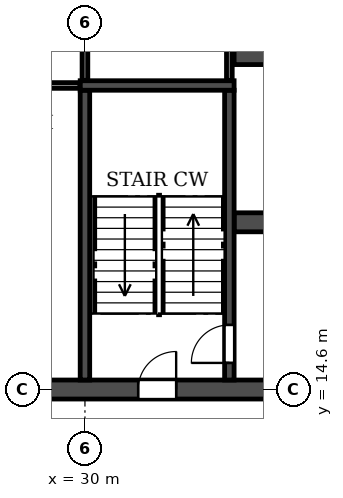
"""IFC4 building model, lengths in metres.
Left out: names, types, materials, properties, quantities, classifications, styles, units other than length and angle.
Written with IfcOpenShell. Run it as: python <this file> out.ifc"""

import sys

from ifc_helpers import new_model, si_unit, direction, frame, frame_2d, origin, place, context, subcontext, project, spatial, rectangle, extrude, element, fill, save


model = new_model("IFC4")
c1 = context("Model", 3, precision=1e-05, world=origin(), true_north=direction((0.0, 1.0)))
c2 = subcontext(c1, "Body", "Model", "MODEL_VIEW")
j1 = project(units=[si_unit("LENGTHUNIT", "METRE"), si_unit("PLANEANGLEUNIT", "RADIAN")], contexts=[c1])
p1 = place(None, origin())
s1 = spatial("IfcSite", under=j1, at=p1, CompositionType="ELEMENT")
p2 = place(p1, origin())
s2 = spatial("IfcBuilding", under=s1, at=p2, CompositionType="ELEMENT")
p3 = place(p2, frame((0.0, 0.0, 105.9)))
s3 = spatial("IfcBuildingStorey", under=s2, at=p3, CompositionType="ELEMENT", Elevation=105.9)
p4 = place(p3, frame((14.6, 14.6, 0.0), z_axis=(0.0, 0.0, 1.0), x_axis=(1.0, 0.0, 0.0)))
e1 = element("IfcWall", 1, at=p4, inside=s3, PredefinedType="SOLIDWALL", context=c2, shape_type="SweptSolid", body=[
    extrude(rectangle(XDim=72.8, YDim=0.5, at=frame_2d((36.4, 0.0))), origin(), (0.0, 0.0, 1.0), 3.06),
])
p5 = place(p4, frame((4.3, 0.0, 0.0)))
e2 = element("IfcOpeningElement", 2, at=p5, cuts=e1, PredefinedType="OPENING", context=c2, shape_type="SweptSolid", body=[
    extrude(rectangle(XDim=1.0, YDim=2.1, at=frame_2d((0.5, 1.05))), frame((0.0, 0.26, 0.0), z_axis=(0.0, -1.0, 0.0), x_axis=(1.0, 0.0, 0.0)), (0.0, 0.0, 1.0), 0.52),
])
p6 = place(p4, frame((12.25, 0.0, 0.0)))
e3 = element("IfcOpeningElement", 3, at=p6, cuts=e1, PredefinedType="OPENING", context=c2, shape_type="SweptSolid", body=[
    extrude(rectangle(XDim=0.9, YDim=2.1, at=frame_2d((0.45, 1.05))), frame((0.0, 0.26, 0.0), z_axis=(0.0, -1.0, 0.0), x_axis=(1.0, 0.0, 0.0)), (0.0, 0.0, 1.0), 0.52),
])
p7 = place(p4, frame((16.8, 0.0, 0.0)))
e4 = element("IfcOpeningElement", 4, at=p7, cuts=e1, PredefinedType="OPENING", context=c2, shape_type="SweptSolid", body=[
    extrude(rectangle(XDim=1.0, YDim=2.1, at=frame_2d((0.5, 1.05))), frame((0.0, 0.26, 0.0), z_axis=(0.0, -1.0, 0.0), x_axis=(1.0, 0.0, 0.0)), (0.0, 0.0, 1.0), 0.52),
])
p8 = place(p4, frame((30.7, 0.0, 0.0)))
e5 = element("IfcOpeningElement", 5, at=p8, cuts=e1, PredefinedType="OPENING", context=c2, shape_type="SweptSolid", body=[
    extrude(rectangle(XDim=1.0, YDim=2.1, at=frame_2d((0.5, 1.05))), frame((0.0, 0.26, 0.0), z_axis=(0.0, -1.0, 0.0), x_axis=(1.0, 0.0, 0.0)), (0.0, 0.0, 1.0), 0.52),
])
p9 = place(p4, frame((35.9, 0.0, 0.0)))
e6 = element("IfcOpeningElement", 6, at=p9, cuts=e1, PredefinedType="OPENING", context=c2, shape_type="SweptSolid", body=[
    extrude(rectangle(XDim=1.0, YDim=2.1, at=frame_2d((0.5, 1.05))), frame((0.0, 0.26, 0.0), z_axis=(0.0, -1.0, 0.0), x_axis=(1.0, 0.0, 0.0)), (0.0, 0.0, 1.0), 0.52),
])
p10 = place(p4, frame((39.8, 0.0, 0.0)))
e7 = element("IfcOpeningElement", 7, at=p10, cuts=e1, PredefinedType="OPENING", context=c2, shape_type="SweptSolid", body=[
    extrude(rectangle(XDim=1.0, YDim=2.1, at=frame_2d((0.5, 1.05))), frame((0.0, 0.26, 0.0), z_axis=(0.0, -1.0, 0.0), x_axis=(1.0, 0.0, 0.0)), (0.0, 0.0, 1.0), 0.52),
])
p11 = place(p4, frame((43.7, 0.0, 0.0)))
e8 = element("IfcOpeningElement", 8, at=p11, cuts=e1, PredefinedType="OPENING", context=c2, shape_type="SweptSolid", body=[
    extrude(rectangle(XDim=1.0, YDim=2.1, at=frame_2d((0.5, 1.05))), frame((0.0, 0.26, 0.0), z_axis=(0.0, -1.0, 0.0), x_axis=(1.0, 0.0, 0.0)), (0.0, 0.0, 1.0), 0.52),
])
p12 = place(p4, frame((55.0, 0.0, 0.0)))
e9 = element("IfcOpeningElement", 9, at=p12, cuts=e1, PredefinedType="OPENING", context=c2, shape_type="SweptSolid", body=[
    extrude(rectangle(XDim=1.0, YDim=2.1, at=frame_2d((0.5, 1.05))), frame((0.0, 0.26, 0.0), z_axis=(0.0, -1.0, 0.0), x_axis=(1.0, 0.0, 0.0)), (0.0, 0.0, 1.0), 0.52),
])
p13 = place(p4, frame((59.65, 0.0, 0.0)))
e10 = element("IfcOpeningElement", 10, at=p13, cuts=e1, PredefinedType="OPENING", context=c2, shape_type="SweptSolid", body=[
    extrude(rectangle(XDim=0.9, YDim=2.1, at=frame_2d((0.45, 1.05))), frame((0.0, 0.26, 0.0), z_axis=(0.0, -1.0, 0.0), x_axis=(1.0, 0.0, 0.0)), (0.0, 0.0, 1.0), 0.52),
])
p14 = place(p4, frame((67.5, 0.0, 0.0)))
e11 = element("IfcOpeningElement", 11, at=p14, cuts=e1, PredefinedType="OPENING", context=c2, shape_type="SweptSolid", body=[
    extrude(rectangle(XDim=1.0, YDim=2.1, at=frame_2d((0.5, 1.05))), frame((0.0, 0.26, 0.0), z_axis=(0.0, -1.0, 0.0), x_axis=(1.0, 0.0, 0.0)), (0.0, 0.0, 1.0), 0.52),
])
p15 = place(p3, frame((33.925, 19.0, 0.0), z_axis=(0.0, 0.0, 1.0), x_axis=(1.0, 0.0, 0.0)))
e12 = element("IfcWall", 12, at=p15, inside=s3, PredefinedType="SOLIDWALL", context=c2, shape_type="SweptSolid", body=[
    extrude(rectangle(XDim=34.15, YDim=0.5, at=frame_2d((17.075, 0.0))), origin(), (0.0, 0.0, 1.0), 3.06),
])
p16 = place(p15, frame((16.175, 0.0, 0.0)))
e13 = element("IfcOpeningElement", 13, at=p16, cuts=e12, PredefinedType="OPENING", context=c2, shape_type="SweptSolid", body=[
    extrude(rectangle(XDim=1.8, YDim=2.1, at=frame_2d((0.9, 1.05))), frame((0.0, 0.26, 0.0), z_axis=(0.0, -1.0, 0.0), x_axis=(1.0, 0.0, 0.0)), (0.0, 0.0, 1.0), 0.52),
])
p17 = place(p15, frame((1.525, 0.0, 0.0)))
e14 = element("IfcOpeningElement", 14, at=p17, cuts=e12, PredefinedType="OPENING", context=c2, shape_type="SweptSolid", body=[
    extrude(rectangle(XDim=1.8, YDim=2.1, at=frame_2d((0.9, 1.05))), frame((0.0, 0.26, 0.0), z_axis=(0.0, -1.0, 0.0), x_axis=(1.0, 0.0, 0.0)), (0.0, 0.0, 1.0), 0.52),
])
p18 = place(p15, frame((8.725, 0.0, 0.0)))
e15 = element("IfcOpeningElement", 15, at=p18, cuts=e12, PredefinedType="OPENING", context=c2, shape_type="SweptSolid", body=[
    extrude(rectangle(XDim=1.1, YDim=2.1, at=frame_2d((0.55, 1.05))), frame((0.0, 0.26, 0.0), z_axis=(0.0, -1.0, 0.0), x_axis=(1.0, 0.0, 0.0)), (0.0, 0.0, 1.0), 0.52),
])
p19 = place(p15, frame((11.325, 0.0, 0.0)))
e16 = element("IfcOpeningElement", 16, at=p19, cuts=e12, PredefinedType="OPENING", context=c2, shape_type="SweptSolid", body=[
    extrude(rectangle(XDim=1.1, YDim=2.1, at=frame_2d((0.55, 1.05))), frame((0.0, 0.26, 0.0), z_axis=(0.0, -1.0, 0.0), x_axis=(1.0, 0.0, 0.0)), (0.0, 0.0, 1.0), 0.52),
])
p20 = place(p15, frame((13.925, 0.0, 0.0)))
e17 = element("IfcOpeningElement", 17, at=p20, cuts=e12, PredefinedType="OPENING", context=c2, shape_type="SweptSolid", body=[
    extrude(rectangle(XDim=1.1, YDim=2.1, at=frame_2d((0.55, 1.05))), frame((0.0, 0.26, 0.0), z_axis=(0.0, -1.0, 0.0), x_axis=(1.0, 0.0, 0.0)), (0.0, 0.0, 1.0), 0.52),
])
p21 = place(p15, frame((19.125, 0.0, 0.0)))
e18 = element("IfcOpeningElement", 18, at=p21, cuts=e12, PredefinedType="OPENING", context=c2, shape_type="SweptSolid", body=[
    extrude(rectangle(XDim=1.1, YDim=2.1, at=frame_2d((0.55, 1.05))), frame((0.0, 0.26, 0.0), z_axis=(0.0, -1.0, 0.0), x_axis=(1.0, 0.0, 0.0)), (0.0, 0.0, 1.0), 0.52),
])
p22 = place(p15, frame((21.725, 0.0, 0.0)))
e19 = element("IfcOpeningElement", 19, at=p22, cuts=e12, PredefinedType="OPENING", context=c2, shape_type="SweptSolid", body=[
    extrude(rectangle(XDim=1.1, YDim=2.1, at=frame_2d((0.55, 1.05))), frame((0.0, 0.26, 0.0), z_axis=(0.0, -1.0, 0.0), x_axis=(1.0, 0.0, 0.0)), (0.0, 0.0, 1.0), 0.52),
])
p23 = place(p15, frame((24.325, 0.0, 0.0)))
e20 = element("IfcOpeningElement", 20, at=p23, cuts=e12, PredefinedType="OPENING", context=c2, shape_type="SweptSolid", body=[
    extrude(rectangle(XDim=1.1, YDim=2.1, at=frame_2d((0.55, 1.05))), frame((0.0, 0.26, 0.0), z_axis=(0.0, -1.0, 0.0), x_axis=(1.0, 0.0, 0.0)), (0.0, 0.0, 1.0), 0.52),
])
p24 = place(p15, frame((30.825, 0.0, 0.0)))
e21 = element("IfcOpeningElement", 21, at=p24, cuts=e12, PredefinedType="OPENING", context=c2, shape_type="SweptSolid", body=[
    extrude(rectangle(XDim=1.8, YDim=2.1, at=frame_2d((0.9, 1.05))), frame((0.0, 0.26, 0.0), z_axis=(0.0, -1.0, 0.0), x_axis=(1.0, 0.0, 0.0)), (0.0, 0.0, 1.0), 0.52),
])
p25 = place(p3, frame((33.925, 23.4, 0.0), z_axis=(0.0, 0.0, 1.0), x_axis=(1.0, 0.0, 0.0)))
e22 = element("IfcWall", 22, at=p25, inside=s3, PredefinedType="SOLIDWALL", context=c2, shape_type="SweptSolid", body=[
    extrude(rectangle(XDim=34.15, YDim=0.5, at=frame_2d((17.075, 0.0))), origin(), (0.0, 0.0, 1.0), 3.06),
])
p26 = place(p25, frame((16.175, 0.0, 0.0)))
e23 = element("IfcOpeningElement", 23, at=p26, cuts=e22, PredefinedType="OPENING", context=c2, shape_type="SweptSolid", body=[
    extrude(rectangle(XDim=1.8, YDim=2.1, at=frame_2d((0.9, 1.05))), frame((0.0, 0.26, 0.0), z_axis=(0.0, -1.0, 0.0), x_axis=(1.0, 0.0, 0.0)), (0.0, 0.0, 1.0), 0.52),
])
p27 = place(p25, frame((11.025, 0.0, 0.0)))
e24 = element("IfcOpeningElement", 24, at=p27, cuts=e22, PredefinedType="OPENING", context=c2, shape_type="SweptSolid", body=[
    extrude(rectangle(XDim=1.1, YDim=2.1, at=frame_2d((0.55, 1.05))), frame((0.0, 0.26, 0.0), z_axis=(0.0, -1.0, 0.0), x_axis=(1.0, 0.0, 0.0)), (0.0, 0.0, 1.0), 0.52),
])
p28 = place(p3, frame((30.0, 14.85, 0.0), z_axis=(0.0, 0.0, 1.0), x_axis=(0.0, 1.0, 0.0)))
e25 = element("IfcWall", 25, at=p28, inside=s3, PredefinedType="SOLIDWALL", context=c2, shape_type="SweptSolid", body=[
    extrude(rectangle(XDim=7.625, YDim=0.25, at=frame_2d((3.812, 0.0))), origin(), (0.0, 0.0, 1.0), 3.06),
])
p29 = place(p3, frame((33.8, 14.85, 0.0), z_axis=(0.0, 0.0, 1.0), x_axis=(0.0, 1.0, 0.0)))
e26 = element("IfcWall", 26, at=p29, inside=s3, PredefinedType="SOLIDWALL", context=c2, shape_type="SweptSolid", body=[
    extrude(rectangle(XDim=7.625, YDim=0.25, at=frame_2d((3.812, 0.0))), origin(), (0.0, 0.0, 1.0), 3.06),
])
p30 = place(p29, frame((0.45, 0.0, 0.0)))
e27 = element("IfcOpeningElement", 27, at=p30, cuts=e26, PredefinedType="OPENING", context=c2, shape_type="SweptSolid", body=[
    extrude(rectangle(XDim=1.0, YDim=2.1, at=frame_2d((0.5, 1.05))), frame((0.0, 0.135, 0.0), z_axis=(0.0, -1.0, 0.0), x_axis=(1.0, 0.0, 0.0)), (0.0, 0.0, 1.0), 0.27),
])
p31 = place(p3, frame((29.875, 22.6, 0.0), z_axis=(0.0, 0.0, 1.0), x_axis=(1.0, 0.0, 0.0)))
e28 = element("IfcWall", 28, at=p31, inside=s3, PredefinedType="SOLIDWALL", context=c2, shape_type="SweptSolid", body=[
    extrude(rectangle(XDim=4.05, YDim=0.25, at=frame_2d((2.025, 0.0))), origin(), (0.0, 0.0, 1.0), 3.06),
])
p32 = place(p3, frame((24.735, 22.6, 0.0), z_axis=(0.0, 0.0, 1.0), x_axis=(1.0, 0.0, 0.0)))
e29 = element("IfcWall", 29, at=p32, inside=s3, PredefinedType="PARTITIONING", context=c2, shape_type="SweptSolid", body=[
    extrude(rectangle(XDim=5.13, YDim=0.15, at=frame_2d((2.565, 0.0))), origin(), (0.0, 0.0, 1.0), 3.06),
])
for number, where, z_axis, x_axis in (
    (30, (30.0, 22.735, 0.0), (0.0, 0.0, 1.0), (0.0, 1.0, 0.0)),
    (31, (33.8, 22.735, 0.0), (0.0, 0.0, 1.0), (0.0, 1.0, 0.0)),
):
    element("IfcWall", number, at=place(p3, frame(where, z_axis=z_axis, x_axis=x_axis)), inside=s3, PredefinedType="PARTITIONING", context=c2, shape_type="SweptSolid", body=[
        extrude(rectangle(XDim=4.805, YDim=0.15, at=frame_2d((2.402, 0.0))), origin(), (0.0, 0.0, 1.0), 3.06),
    ])
p33 = place(p7, origin())
e32 = element("IfcDoor", 32, at=p33, inside=s3, OperationType="SINGLE_SWING_RIGHT", PredefinedType="DOOR", context=c2, shape_type="SweptSolid", body=[
    extrude(rectangle(XDim=1.0, YDim=2.1, at=frame_2d((0.5, 1.05))), frame((0.0, 0.025, 0.0), z_axis=(0.0, -1.0, 0.0), x_axis=(1.0, 0.0, 0.0)), (0.0, 0.0, 1.0), 0.05),
])
fill(e4, e32)
p34 = place(p30, origin())
e33 = element("IfcDoor", 33, at=p34, inside=s3, OperationType="SINGLE_SWING_LEFT", PredefinedType="DOOR", context=c2, shape_type="SweptSolid", body=[
    extrude(rectangle(XDim=1.0, YDim=2.1, at=frame_2d((0.5, 1.05))), frame((0.0, 0.025, 0.0), z_axis=(0.0, -1.0, 0.0), x_axis=(1.0, 0.0, 0.0)), (0.0, 0.0, 1.0), 0.05),
])
fill(e27, e33)
save(model, sys.argv[1])
